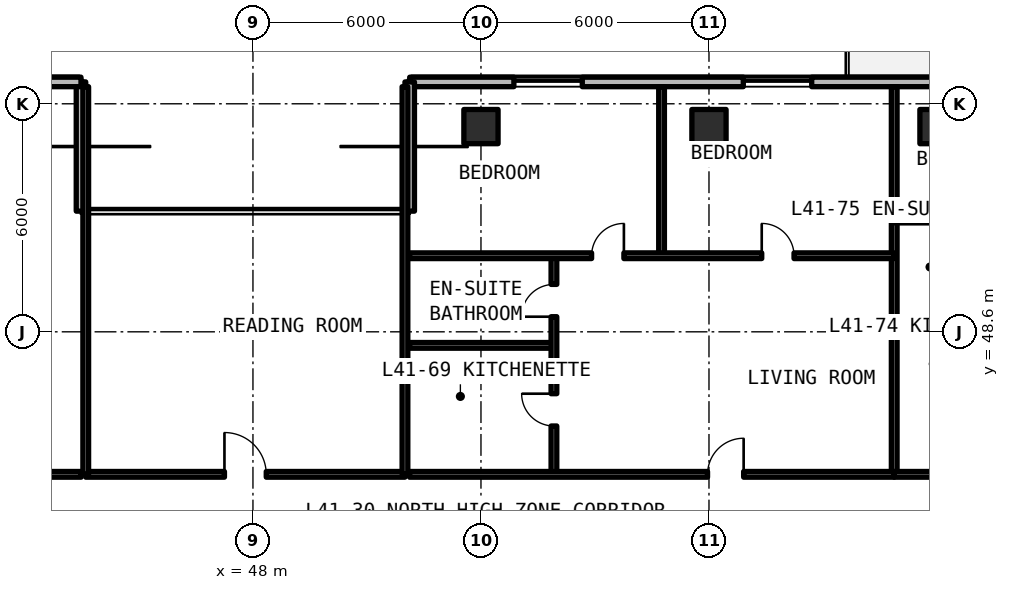
"""IFC4 building model, lengths in metres.
Left out: names, types, materials, properties, quantities, classifications, styles, units other than length and angle.
Written with IfcOpenShell. Run it as: python <this file> out.ifc"""

import sys

from ifc_helpers import new_model, si_unit, direction, frame, frame_2d, origin, origin_2d, place, context, subcontext, project, spatial, rectangle, extrude, element, fill, save


model = new_model("IFC4")
c1 = context("Model", 3, precision=1e-05, world=origin(), true_north=direction((0.0, 1.0)))
c2 = subcontext(c1, "Body", "Model", "MODEL_VIEW")
j1 = project(units=[si_unit("LENGTHUNIT", "METRE"), si_unit("PLANEANGLEUNIT", "RADIAN")], contexts=[c1])
p1 = place(None, origin())
s1 = spatial("IfcSite", under=j1, at=p1, CompositionType="ELEMENT")
p2 = place(p1, origin())
s2 = spatial("IfcBuilding", under=s1, at=p2, CompositionType="ELEMENT")
p3 = place(p2, frame((0.0, 0.0, 148.5)))
s3 = spatial("IfcBuildingStorey", under=s2, at=p3, CompositionType="ELEMENT", Elevation=148.5)
for number, where, z_axis, x_axis in (
    (1, (54.0, 54.0, 0.0), (0.0, 0.0, 1.0), (1.0, 0.0, 0.0)),
    (2, (60.0, 54.0, 0.0), (0.0, 0.0, 1.0), (1.0, 0.0, 0.0)),
    (3, (66.0, 54.0, 0.0), (0.0, 0.0, 1.0), (1.0, 0.0, 0.0)),
):
    element("IfcColumn", number, at=place(p3, frame(where, z_axis=z_axis, x_axis=x_axis)), inside=s3, PredefinedType="COLUMN", context=c2, shape_type="SweptSolid", body=[
        extrude(rectangle(XDim=0.9, YDim=0.9, at=origin_2d()), origin(), (0.0, 0.0, 1.0), 3.3),
    ])
p4 = place(p3, frame((95.748, 55.175, 0.0), z_axis=(0.0, 0.0, 1.0), x_axis=(-1.0, 0.0, 0.0)))
e4 = element("IfcWall", 4, at=p4, inside=s3, PredefinedType="SOLIDWALL", context=c2, shape_type="SweptSolid", body=[
    extrude(rectangle(XDim=43.623, YDim=0.25, at=frame_2d((21.812, 0.0))), origin(), (0.0, 0.0, 1.0), 3.08),
])
p5 = place(p4, frame((26.748, 0.0, 0.0)))
e5 = element("IfcOpeningElement", 5, at=p5, cuts=e4, PredefinedType="OPENING", context=c2, shape_type="SweptSolid", body=[
    extrude(rectangle(XDim=1.1, YDim=2.15, at=frame_2d((0.55, 1.075))), frame((0.0, 0.135, 0.0), z_axis=(0.0, -1.0, 0.0), x_axis=(1.0, 0.0, 0.0)), (0.0, 0.0, 1.0), 0.27),
])
p6 = place(p4, frame((14.898, 0.0, 0.0)))
e6 = element("IfcOpeningElement", 6, at=p6, cuts=e4, PredefinedType="OPENING", context=c2, shape_type="SweptSolid", body=[
    extrude(rectangle(XDim=1.1, YDim=2.15, at=frame_2d((0.55, 1.075))), frame((0.0, 0.135, 0.0), z_axis=(0.0, -1.0, 0.0), x_axis=(1.0, 0.0, 0.0)), (0.0, 0.0, 1.0), 0.27),
])
p7 = place(p4, frame((39.082, 0.0, 0.78)))
e7 = element("IfcOpeningElement", 7, at=p7, cuts=e4, PredefinedType="OPENING", context=c2, shape_type="SweptSolid", body=[
    extrude(rectangle(XDim=1.8, YDim=1.66, at=frame_2d((0.9, 0.83))), frame((0.0, 0.135, 0.0), z_axis=(0.0, -1.0, 0.0), x_axis=(1.0, 0.0, 0.0)), (0.0, 0.0, 1.0), 0.27),
])
p8 = place(p4, frame((33.045, 0.0, 0.78)))
e8 = element("IfcOpeningElement", 8, at=p8, cuts=e4, PredefinedType="OPENING", context=c2, shape_type="SweptSolid", body=[
    extrude(rectangle(XDim=1.8, YDim=1.66, at=frame_2d((0.9, 0.83))), frame((0.0, 0.135, 0.0), z_axis=(0.0, -1.0, 0.0), x_axis=(1.0, 0.0, 0.0)), (0.0, 0.0, 1.0), 0.27),
])
p9 = place(p4, frame((8.462, 0.0, 0.78)))
e9 = element("IfcOpeningElement", 9, at=p9, cuts=e4, PredefinedType="OPENING", context=c2, shape_type="SweptSolid", body=[
    extrude(rectangle(XDim=1.8, YDim=1.66, at=frame_2d((0.9, 0.83))), frame((0.0, 0.135, 0.0), z_axis=(0.0, -1.0, 0.0), x_axis=(1.0, 0.0, 0.0)), (0.0, 0.0, 1.0), 0.27),
])
p10 = place(p4, frame((2.25, 0.0, 0.78)))
e10 = element("IfcOpeningElement", 10, at=p10, cuts=e4, PredefinedType="OPENING", context=c2, shape_type="SweptSolid", body=[
    extrude(rectangle(XDim=1.8, YDim=1.66, at=frame_2d((0.9, 0.83))), frame((0.0, 0.135, 0.0), z_axis=(0.0, -1.0, 0.0), x_axis=(1.0, 0.0, 0.0)), (0.0, 0.0, 1.0), 0.27),
])
for number, where, z_axis, x_axis in (
    (11, (52.125, 55.175, 0.0), (0.0, 0.0, 1.0), (0.0, -1.0, 0.0)),
    (12, (43.475, 51.775, 0.0), (0.0, 0.0, 1.0), (0.0, 1.0, 0.0)),
):
    element("IfcWall", number, at=place(p3, frame(where, z_axis=z_axis, x_axis=x_axis)), inside=s3, PredefinedType="SOLIDWALL", context=c2, shape_type="SweptSolid", body=[
        extrude(rectangle(XDim=3.4, YDim=0.25, at=frame_2d((1.7, 0.0))), origin(), (0.0, 0.0, 1.0), 3.08),
    ])
p11 = place(p3, frame((43.475, 55.175, 0.0), z_axis=(0.0, 0.0, 1.0), x_axis=(-1.0, 0.0, 0.0)))
e13 = element("IfcWall", 13, at=p11, inside=s3, PredefinedType="SOLIDWALL", context=c2, shape_type="SweptSolid", body=[
    extrude(rectangle(XDim=19.623, YDim=0.25, at=frame_2d((9.812, 0.0))), origin(), (0.0, 0.0, 1.0), 3.08),
])
p12 = place(p11, frame((9.525, 0.0, 0.0)))
e14 = element("IfcOpeningElement", 14, at=p12, cuts=e13, PredefinedType="OPENING", context=c2, shape_type="SweptSolid", body=[
    extrude(rectangle(XDim=1.1, YDim=2.15, at=frame_2d((0.55, 1.075))), frame((0.0, 0.135, 0.0), z_axis=(0.0, -1.0, 0.0), x_axis=(1.0, 0.0, 0.0)), (0.0, 0.0, 1.0), 0.27),
])
p13 = place(p11, frame((15.78, 0.0, 0.78)))
e15 = element("IfcOpeningElement", 15, at=p13, cuts=e13, PredefinedType="OPENING", context=c2, shape_type="SweptSolid", body=[
    extrude(rectangle(XDim=1.8, YDim=1.66, at=frame_2d((0.9, 0.83))), frame((0.0, 0.135, 0.0), z_axis=(0.0, -1.0, 0.0), x_axis=(1.0, 0.0, 0.0)), (0.0, 0.0, 1.0), 0.27),
])
p14 = place(p11, frame((5.315, 0.0, 0.78)))
e16 = element("IfcOpeningElement", 16, at=p14, cuts=e13, PredefinedType="OPENING", context=c2, shape_type="SweptSolid", body=[
    extrude(rectangle(XDim=1.4, YDim=1.65, at=frame_2d((0.7, 0.825))), frame((0.0, 0.135, 0.0), z_axis=(0.0, -1.0, 0.0), x_axis=(1.0, 0.0, 0.0)), (0.0, 0.0, 1.0), 0.27),
])
p15 = place(p11, frame((2.382, 0.0, 0.78)))
e17 = element("IfcOpeningElement", 17, at=p15, cuts=e13, PredefinedType="OPENING", context=c2, shape_type="SweptSolid", body=[
    extrude(rectangle(XDim=1.4, YDim=1.65, at=frame_2d((0.7, 0.825))), frame((0.0, 0.135, 0.0), z_axis=(0.0, -1.0, 0.0), x_axis=(1.0, 0.0, 0.0)), (0.0, 0.0, 1.0), 0.27),
])
p16 = place(p3, frame((43.6, 44.85, 0.0), z_axis=(0.0, 0.0, 1.0), x_axis=(1.0, 0.0, 0.0)))
e18 = element("IfcWall", 18, at=p16, inside=s3, PredefinedType="SOLIDWALL", context=c2, shape_type="SweptSolid", body=[
    extrude(rectangle(XDim=8.4, YDim=0.15, at=frame_2d((4.2, 0.0))), origin(), (0.0, 0.0, 1.0), 2.35),
])
p17 = place(p16, frame((3.65, 0.0, 0.0)))
e19 = element("IfcOpeningElement", 19, at=p17, cuts=e18, PredefinedType="OPENING", context=c2, shape_type="SweptSolid", body=[
    extrude(rectangle(XDim=1.1, YDim=2.15, at=frame_2d((0.55, 1.075))), frame((0.0, 0.085, 0.0), z_axis=(0.0, -1.0, 0.0), x_axis=(1.0, 0.0, 0.0)), (0.0, 0.0, 1.0), 0.17),
])
for number, where, z_axis, x_axis in (
    (20, (43.6, 44.85, 0.0), (0.0, 0.0, 1.0), (0.0, 1.0, 0.0)),
    (21, (52.0, 44.85, 0.0), (0.0, 0.0, 1.0), (0.0, 1.0, 0.0)),
):
    element("IfcWall", number, at=place(p3, frame(where, z_axis=z_axis, x_axis=x_axis)), inside=s3, PredefinedType="SOLIDWALL", context=c2, shape_type="SweptSolid", body=[
        extrude(rectangle(XDim=10.2, YDim=0.15, at=frame_2d((5.1, 0.0))), origin(), (0.0, 0.0, 1.0), 2.35),
    ])
p18 = place(p3, frame((38.906, 44.85, 0.0), z_axis=(0.0, 0.0, 1.0), x_axis=(1.0, 0.0, 0.0)))
e22 = element("IfcWall", 22, at=p18, inside=s3, PredefinedType="SOLIDWALL", context=c2, shape_type="SweptSolid", body=[
    extrude(rectangle(XDim=4.573, YDim=0.15, at=frame_2d((2.287, 0.0))), origin(), (0.0, 0.0, 1.0), 2.35),
])
p19 = place(p18, frame((1.812, 0.0, 0.0)))
e23 = element("IfcOpeningElement", 23, at=p19, cuts=e22, PredefinedType="OPENING", context=c2, shape_type="SweptSolid", body=[
    extrude(rectangle(XDim=0.95, YDim=2.15, at=frame_2d((0.475, 1.075))), frame((0.0, 0.085, 0.0), z_axis=(0.0, -1.0, 0.0), x_axis=(1.0, 0.0, 0.0)), (0.0, 0.0, 1.0), 0.17),
])
p20 = place(p3, frame((64.874, 44.85, 0.0), z_axis=(0.0, 0.0, 1.0), x_axis=(0.0, 1.0, 0.0)))
e24 = element("IfcWall", 24, at=p20, inside=s3, PredefinedType="SOLIDWALL", context=c2, shape_type="SweptSolid", body=[
    extrude(rectangle(XDim=10.2, YDim=0.15, at=frame_2d((5.1, 0.0))), origin(), (0.0, 0.0, 1.0), 2.35),
])
p21 = place(p3, frame((52.12, 48.244, 0.0), z_axis=(0.0, 0.0, 1.0), x_axis=(1.0, 0.0, 0.0)))
e25 = element("IfcWall", 25, at=p21, inside=s3, PredefinedType="PARTITIONING", context=c2, shape_type="SweptSolid", body=[
    extrude(rectangle(XDim=3.8, YDim=0.15, at=frame_2d((1.9, 0.0))), origin(), (0.0, 0.0, 1.0), 2.35),
])
p22 = place(p3, frame((55.92, 44.85, 0.0), z_axis=(0.0, 0.0, 1.0), x_axis=(0.0, 1.0, 0.0)))
e26 = element("IfcWall", 26, at=p22, inside=s3, PredefinedType="PARTITIONING", context=c2, shape_type="SweptSolid", body=[
    extrude(rectangle(XDim=5.752, YDim=0.15, at=frame_2d((2.876, 0.0))), origin(), (0.0, 0.0, 1.0), 2.35),
])
p23 = place(p22, frame((1.272, 0.0, 0.0)))
e27 = element("IfcOpeningElement", 27, at=p23, cuts=e26, PredefinedType="OPENING", context=c2, shape_type="SweptSolid", body=[
    extrude(rectangle(XDim=0.85, YDim=2.1, at=frame_2d((0.425, 1.05))), frame((0.0, 0.085, 0.0), z_axis=(0.0, -1.0, 0.0), x_axis=(1.0, 0.0, 0.0)), (0.0, 0.0, 1.0), 0.17),
])
p24 = place(p22, frame((4.148, 0.0, 0.0)))
e28 = element("IfcOpeningElement", 28, at=p24, cuts=e26, PredefinedType="OPENING", context=c2, shape_type="SweptSolid", body=[
    extrude(rectangle(XDim=0.85, YDim=2.1, at=frame_2d((0.425, 1.05))), frame((0.0, 0.085, 0.0), z_axis=(0.0, -1.0, 0.0), x_axis=(1.0, 0.0, 0.0)), (0.0, 0.0, 1.0), 0.17),
])
p25 = place(p3, frame((58.752, 50.602, 0.0), z_axis=(0.0, 0.0, 1.0), x_axis=(0.0, 1.0, 0.0)))
e29 = element("IfcWall", 29, at=p25, inside=s3, PredefinedType="PARTITIONING", context=c2, shape_type="SweptSolid", body=[
    extrude(rectangle(XDim=4.448, YDim=0.15, at=frame_2d((2.224, 0.0))), origin(), (0.0, 0.0, 1.0), 2.35),
])
p26 = place(p3, frame((52.12, 50.602, 0.0), z_axis=(0.0, 0.0, 1.0), x_axis=(1.0, 0.0, 0.0)))
e30 = element("IfcWall", 30, at=p26, inside=s3, PredefinedType="PARTITIONING", context=c2, shape_type="SweptSolid", body=[
    extrude(rectangle(XDim=12.754, YDim=0.15, at=frame_2d((6.377, 0.0))), origin(), (0.0, 0.0, 1.0), 2.35),
])
p27 = place(p26, frame((4.791, 0.0, 0.0)))
e31 = element("IfcOpeningElement", 31, at=p27, cuts=e30, PredefinedType="OPENING", context=c2, shape_type="SweptSolid", body=[
    extrude(rectangle(XDim=0.85, YDim=2.1, at=frame_2d((0.425, 1.05))), frame((0.0, 0.085, 0.0), z_axis=(0.0, -1.0, 0.0), x_axis=(1.0, 0.0, 0.0)), (0.0, 0.0, 1.0), 0.17),
])
p28 = place(p26, frame((9.268, 0.0, 0.0)))
e32 = element("IfcOpeningElement", 32, at=p28, cuts=e30, PredefinedType="OPENING", context=c2, shape_type="SweptSolid", body=[
    extrude(rectangle(XDim=0.85, YDim=2.1, at=frame_2d((0.425, 1.05))), frame((0.0, 0.085, 0.0), z_axis=(0.0, -1.0, 0.0), x_axis=(1.0, 0.0, 0.0)), (0.0, 0.0, 1.0), 0.17),
])
p29 = place(p3, frame((52.12, 44.85, 0.0), z_axis=(0.0, 0.0, 1.0), x_axis=(1.0, 0.0, 0.0)))
e33 = element("IfcWall", 33, at=p29, inside=s3, PredefinedType="SOLIDWALL", context=c2, shape_type="SweptSolid", body=[
    extrude(rectangle(XDim=12.754, YDim=0.15, at=frame_2d((6.377, 0.0))), origin(), (0.0, 0.0, 1.0), 2.35),
])
p30 = place(p29, frame((7.842, 0.0, 0.0)))
e34 = element("IfcOpeningElement", 34, at=p30, cuts=e33, PredefinedType="OPENING", context=c2, shape_type="SweptSolid", body=[
    extrude(rectangle(XDim=0.95, YDim=2.15, at=frame_2d((0.475, 1.075))), frame((0.0, 0.085, 0.0), z_axis=(0.0, -1.0, 0.0), x_axis=(1.0, 0.0, 0.0)), (0.0, 0.0, 1.0), 0.17),
])
p31 = place(p3, frame((64.874, 48.798, 0.0), z_axis=(0.0, 0.0, 1.0), x_axis=(1.0, 0.0, 0.0)))
e35 = element("IfcWall", 35, at=p31, inside=s3, PredefinedType="PARTITIONING", context=c2, shape_type="SweptSolid", body=[
    extrude(rectangle(XDim=3.046, YDim=0.15, at=frame_2d((1.523, 0.0))), origin(), (0.0, 0.0, 1.0), 2.35),
])
p32 = place(p3, frame((64.874, 51.541, 0.0), z_axis=(0.0, 0.0, 1.0), x_axis=(1.0, 0.0, 0.0)))
e36 = element("IfcWall", 36, at=p32, inside=s3, PredefinedType="PARTITIONING", context=c2, shape_type="SweptSolid", body=[
    extrude(rectangle(XDim=8.406, YDim=0.15, at=frame_2d((4.203, 0.0))), origin(), (0.0, 0.0, 1.0), 2.35),
])
p33 = place(p32, frame((5.341, 0.0, 0.0)))
e37 = element("IfcOpeningElement", 37, at=p33, cuts=e36, PredefinedType="OPENING", context=c2, shape_type="SweptSolid", body=[
    extrude(rectangle(XDim=0.85, YDim=2.1, at=frame_2d((0.425, 1.05))), frame((0.0, 0.085, 0.0), z_axis=(0.0, -1.0, 0.0), x_axis=(1.0, 0.0, 0.0)), (0.0, 0.0, 1.0), 0.17),
])
p34 = place(p3, frame((64.874, 44.85, 0.0), z_axis=(0.0, 0.0, 1.0), x_axis=(1.0, 0.0, 0.0)))
e38 = element("IfcWall", 38, at=p34, inside=s3, PredefinedType="SOLIDWALL", context=c2, shape_type="SweptSolid", body=[
    extrude(rectangle(XDim=8.406, YDim=0.15, at=frame_2d((4.203, 0.0))), origin(), (0.0, 0.0, 1.0), 2.35),
])
p35 = place(p34, frame((5.291, 0.0, 0.0)))
e39 = element("IfcOpeningElement", 39, at=p35, cuts=e38, PredefinedType="OPENING", context=c2, shape_type="SweptSolid", body=[
    extrude(rectangle(XDim=0.95, YDim=2.15, at=frame_2d((0.475, 1.075))), frame((0.0, 0.085, 0.0), z_axis=(0.0, -1.0, 0.0), x_axis=(1.0, 0.0, 0.0)), (0.0, 0.0, 1.0), 0.17),
])
p36 = place(p7, origin())
e40 = element("IfcWindow", 40, at=p36, inside=s3, PartitioningType="SINGLE_PANEL", PredefinedType="WINDOW", context=c2, shape_type="SweptSolid", body=[
    extrude(rectangle(XDim=1.8, YDim=1.66, at=frame_2d((0.9, 0.83))), frame((0.0, 0.03, 0.0), z_axis=(0.0, -1.0, 0.0), x_axis=(1.0, 0.0, 0.0)), (0.0, 0.0, 1.0), 0.06),
])
fill(e7, e40)
p37 = place(p8, origin())
e41 = element("IfcWindow", 41, at=p37, inside=s3, PartitioningType="SINGLE_PANEL", PredefinedType="WINDOW", context=c2, shape_type="SweptSolid", body=[
    extrude(rectangle(XDim=1.8, YDim=1.66, at=frame_2d((0.9, 0.83))), frame((0.0, 0.03, 0.0), z_axis=(0.0, -1.0, 0.0), x_axis=(1.0, 0.0, 0.0)), (0.0, 0.0, 1.0), 0.06),
])
fill(e8, e41)
p38 = place(p17, origin())
e42 = element("IfcDoor", 42, at=p38, inside=s3, OperationType="SINGLE_SWING_LEFT", PredefinedType="DOOR", context=c2, shape_type="SweptSolid", body=[
    extrude(rectangle(XDim=1.1, YDim=2.15, at=frame_2d((0.55, 1.075))), frame((0.0, 0.025, 0.0), z_axis=(0.0, -1.0, 0.0), x_axis=(1.0, 0.0, 0.0)), (0.0, 0.0, 1.0), 0.05),
])
fill(e19, e42)
p39 = place(p23, origin())
e43 = element("IfcDoor", 43, at=p39, inside=s3, OperationType="SINGLE_SWING_RIGHT", PredefinedType="DOOR", context=c2, shape_type="SweptSolid", body=[
    extrude(rectangle(XDim=0.85, YDim=2.1, at=frame_2d((0.425, 1.05))), frame((0.0, 0.025, 0.0), z_axis=(0.0, -1.0, 0.0), x_axis=(1.0, 0.0, 0.0)), (0.0, 0.0, 1.0), 0.05),
])
fill(e27, e43)
p40 = place(p24, origin())
e44 = element("IfcDoor", 44, at=p40, inside=s3, OperationType="SINGLE_SWING_LEFT", PredefinedType="DOOR", context=c2, shape_type="SweptSolid", body=[
    extrude(rectangle(XDim=0.85, YDim=2.1, at=frame_2d((0.425, 1.05))), frame((0.0, 0.025, 0.0), z_axis=(0.0, -1.0, 0.0), x_axis=(1.0, 0.0, 0.0)), (0.0, 0.0, 1.0), 0.05),
])
fill(e28, e44)
p41 = place(p27, origin())
e45 = element("IfcDoor", 45, at=p41, inside=s3, OperationType="SINGLE_SWING_RIGHT", PredefinedType="DOOR", context=c2, shape_type="SweptSolid", body=[
    extrude(rectangle(XDim=0.85, YDim=2.1, at=frame_2d((0.425, 1.05))), frame((0.0, 0.025, 0.0), z_axis=(0.0, -1.0, 0.0), x_axis=(1.0, 0.0, 0.0)), (0.0, 0.0, 1.0), 0.05),
])
fill(e31, e45)
p42 = place(p28, origin())
e46 = element("IfcDoor", 46, at=p42, inside=s3, OperationType="SINGLE_SWING_LEFT", PredefinedType="DOOR", context=c2, shape_type="SweptSolid", body=[
    extrude(rectangle(XDim=0.85, YDim=2.1, at=frame_2d((0.425, 1.05))), frame((0.0, 0.025, 0.0), z_axis=(0.0, -1.0, 0.0), x_axis=(1.0, 0.0, 0.0)), (0.0, 0.0, 1.0), 0.05),
])
fill(e32, e46)
p43 = place(p30, origin())
e47 = element("IfcDoor", 47, at=p43, inside=s3, OperationType="SINGLE_SWING_RIGHT", PredefinedType="DOOR", context=c2, shape_type="SweptSolid", body=[
    extrude(rectangle(XDim=0.95, YDim=2.15, at=frame_2d((0.475, 1.075))), frame((0.0, 0.025, 0.0), z_axis=(0.0, -1.0, 0.0), x_axis=(1.0, 0.0, 0.0)), (0.0, 0.0, 1.0), 0.05),
])
fill(e34, e47)
save(model, sys.argv[1])
